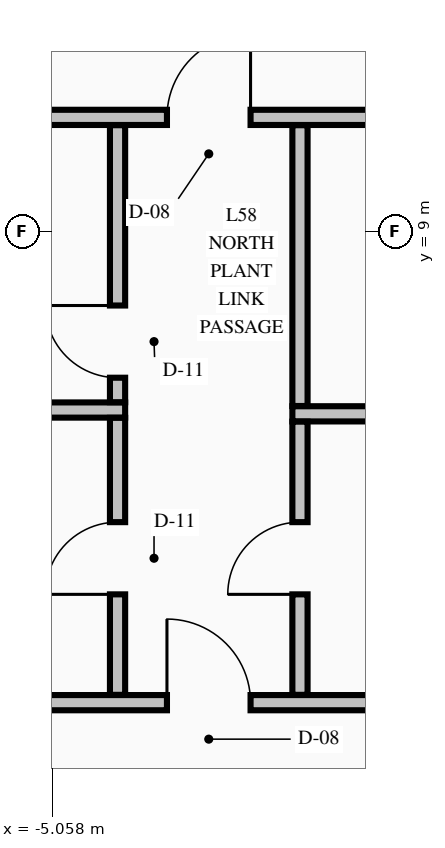
"""IFC4 building model, lengths in metres.
Left out: names, types, materials, properties, quantities, classifications, styles, units other than length and angle.
Written with IfcOpenShell. Run it as: python <this file> out.ifc"""

import sys

from ifc_helpers import new_model, si_unit, direction, frame, frame_2d, origin, place, context, subcontext, project, spatial, rectangle, extrude, element, fill, save


model = new_model("IFC4")
c1 = context("Model", 3, precision=1e-05, world=origin(), true_north=direction((0.0, 1.0)))
c2 = subcontext(c1, "Body", "Model", "MODEL_VIEW")
j1 = project(units=[si_unit("LENGTHUNIT", "METRE"), si_unit("PLANEANGLEUNIT", "RADIAN")], contexts=[c1])
p1 = place(None, origin())
s1 = spatial("IfcSite", under=j1, at=p1, CompositionType="ELEMENT")
p2 = place(p1, origin())
s2 = spatial("IfcBuilding", under=s1, at=p2, CompositionType="ELEMENT")
p3 = place(p2, frame((0.0, 0.0, 222.06)))
s3 = spatial("IfcBuildingStorey", under=s2, at=p3, CompositionType="ELEMENT", Elevation=222.06)
p4 = place(p3, frame((-10.847, 2.8, 0.0), z_axis=(0.0, 0.0, 1.0), x_axis=(1.0, 0.0, 0.0)))
e1 = element("IfcWall", 1, at=p4, inside=s3, PredefinedType="PARTITIONING", context=c2, shape_type="SweptSolid", body=[
    extrude(rectangle(XDim=21.694, YDim=0.2, at=frame_2d((10.847, 0.0))), origin(), (0.0, 0.0, 1.0), 4.335),
])
p5 = place(p4, frame((7.297, 0.0, 0.0)))
e2 = element("IfcOpeningElement", 2, at=p5, cuts=e1, PredefinedType="OPENING", context=c2, shape_type="SweptSolid", body=[
    extrude(rectangle(XDim=1.1, YDim=2.15, at=frame_2d((0.55, 1.075))), frame((0.0, 0.11, 0.0), z_axis=(0.0, -1.0, 0.0), x_axis=(1.0, 0.0, 0.0)), (0.0, 0.0, 1.0), 0.22),
])
p6 = place(p4, frame((17.497, 0.0, 0.0)))
e3 = element("IfcOpeningElement", 3, at=p6, cuts=e1, PredefinedType="OPENING", context=c2, shape_type="SweptSolid", body=[
    extrude(rectangle(XDim=1.1, YDim=2.15, at=frame_2d((0.55, 1.075))), frame((0.0, 0.11, 0.0), z_axis=(0.0, -1.0, 0.0), x_axis=(1.0, 0.0, 0.0)), (0.0, 0.0, 1.0), 0.22),
])
p7 = place(p3, frame((-1.9, 6.6, 0.0), z_axis=(0.0, 0.0, 1.0), x_axis=(1.0, 0.0, 0.0)))
e4 = element("IfcWall", 4, at=p7, inside=s3, PredefinedType="PARTITIONING", context=c2, shape_type="SweptSolid", body=[
    extrude(rectangle(XDim=12.747, YDim=0.2, at=frame_2d((6.374, 0.0))), origin(), (0.0, 0.0, 1.0), 4.335),
])
p8 = place(p3, frame((-10.847, 6.65, 0.0), z_axis=(0.0, 0.0, 1.0), x_axis=(1.0, 0.0, 0.0)))
e5 = element("IfcWall", 5, at=p8, inside=s3, PredefinedType="PARTITIONING", context=c2, shape_type="SweptSolid", body=[
    extrude(rectangle(XDim=6.747, YDim=0.2, at=frame_2d((3.374, 0.0))), origin(), (0.0, 0.0, 1.0), 4.335),
])
p9 = place(p3, frame((-10.788, 10.5, 0.0), z_axis=(0.0, 0.0, 1.0), x_axis=(1.0, 0.0, 0.0)))
e6 = element("IfcWall", 6, at=p9, inside=s3, PredefinedType="PARTITIONING", context=c2, shape_type="SweptSolid", body=[
    extrude(rectangle(XDim=21.576, YDim=0.2, at=frame_2d((10.788, 0.0))), origin(), (0.0, 0.0, 1.0), 4.335),
])
p10 = place(p9, frame((7.238, 0.0, 0.0)))
e7 = element("IfcOpeningElement", 7, at=p10, cuts=e6, PredefinedType="OPENING", context=c2, shape_type="SweptSolid", body=[
    extrude(rectangle(XDim=1.1, YDim=2.15, at=frame_2d((0.55, 1.075))), frame((0.0, 0.11, 0.0), z_axis=(0.0, -1.0, 0.0), x_axis=(1.0, 0.0, 0.0)), (0.0, 0.0, 1.0), 0.22),
])
p11 = place(p3, frame((-4.2, 2.903, 0.0), z_axis=(0.0, 0.0, 1.0), x_axis=(0.0, 1.0, 0.0)))
e8 = element("IfcWall", 8, at=p11, inside=s3, PredefinedType="PARTITIONING", context=c2, shape_type="SweptSolid", body=[
    extrude(rectangle(XDim=3.644, YDim=0.2, at=frame_2d((1.822, 0.0))), origin(), (0.0, 0.0, 1.0), 4.335),
])
p12 = place(p11, frame((1.322, 0.0, 0.0)))
e9 = element("IfcOpeningElement", 9, at=p12, cuts=e8, PredefinedType="OPENING", context=c2, shape_type="SweptSolid", body=[
    extrude(rectangle(XDim=0.95, YDim=2.15, at=frame_2d((0.475, 1.075))), frame((0.0, 0.11, 0.0), z_axis=(0.0, -1.0, 0.0), x_axis=(1.0, 0.0, 0.0)), (0.0, 0.0, 1.0), 0.22),
])
p13 = place(p3, frame((-4.2, 6.753, 0.0), z_axis=(0.0, 0.0, 1.0), x_axis=(0.0, 1.0, 0.0)))
e10 = element("IfcWall", 10, at=p13, inside=s3, PredefinedType="PARTITIONING", context=c2, shape_type="SweptSolid", body=[
    extrude(rectangle(XDim=3.644, YDim=0.2, at=frame_2d((1.822, 0.0))), origin(), (0.0, 0.0, 1.0), 4.335),
])
p14 = place(p13, frame((0.322, 0.0, 0.0)))
e11 = element("IfcOpeningElement", 11, at=p14, cuts=e10, PredefinedType="OPENING", context=c2, shape_type="SweptSolid", body=[
    extrude(rectangle(XDim=0.95, YDim=2.15, at=frame_2d((0.475, 1.075))), frame((0.0, 0.11, 0.0), z_axis=(0.0, -1.0, 0.0), x_axis=(1.0, 0.0, 0.0)), (0.0, 0.0, 1.0), 0.22),
])
p15 = place(p3, frame((-1.8, 2.903, 0.0), z_axis=(0.0, 0.0, 1.0), x_axis=(0.0, 1.0, 0.0)))
e12 = element("IfcWall", 12, at=p15, inside=s3, PredefinedType="PARTITIONING", context=c2, shape_type="SweptSolid", body=[
    extrude(rectangle(XDim=3.594, YDim=0.2, at=frame_2d((1.797, 0.0))), origin(), (0.0, 0.0, 1.0), 4.335),
])
p16 = place(p15, frame((1.322, 0.0, 0.0)))
e13 = element("IfcOpeningElement", 13, at=p16, cuts=e12, PredefinedType="OPENING", context=c2, shape_type="SweptSolid", body=[
    extrude(rectangle(XDim=0.95, YDim=2.15, at=frame_2d((0.475, 1.075))), frame((0.0, 0.11, 0.0), z_axis=(0.0, -1.0, 0.0), x_axis=(1.0, 0.0, 0.0)), (0.0, 0.0, 1.0), 0.22),
])
p17 = place(p3, frame((-1.8, 6.703, 0.0), z_axis=(0.0, 0.0, 1.0), x_axis=(0.0, 1.0, 0.0)))
e14 = element("IfcWall", 14, at=p17, inside=s3, PredefinedType="PARTITIONING", context=c2, shape_type="SweptSolid", body=[
    extrude(rectangle(XDim=3.694, YDim=0.2, at=frame_2d((1.847, 0.0))), origin(), (0.0, 0.0, 1.0), 4.335),
])
p18 = place(p5, origin())
e15 = element("IfcDoor", 15, at=p18, inside=s3, OperationType="SINGLE_SWING_LEFT", PredefinedType="DOOR", context=c2, shape_type="SweptSolid", body=[
    extrude(rectangle(XDim=1.1, YDim=2.15, at=frame_2d((0.55, 1.075))), frame((0.0, 0.025, 0.0), z_axis=(0.0, -1.0, 0.0), x_axis=(1.0, 0.0, 0.0)), (0.0, 0.0, 1.0), 0.05),
])
fill(e2, e15)
p19 = place(p10, origin())
e16 = element("IfcDoor", 16, at=p19, inside=s3, OperationType="SINGLE_SWING_RIGHT", PredefinedType="DOOR", context=c2, shape_type="SweptSolid", body=[
    extrude(rectangle(XDim=1.1, YDim=2.15, at=frame_2d((0.55, 1.075))), frame((0.0, 0.025, 0.0), z_axis=(0.0, -1.0, 0.0), x_axis=(1.0, 0.0, 0.0)), (0.0, 0.0, 1.0), 0.05),
])
fill(e7, e16)
p20 = place(p12, origin())
e17 = element("IfcDoor", 17, at=p20, inside=s3, OperationType="SINGLE_SWING_LEFT", PredefinedType="DOOR", context=c2, shape_type="SweptSolid", body=[
    extrude(rectangle(XDim=0.95, YDim=2.15, at=frame_2d((0.475, 1.075))), frame((0.0, 0.025, 0.0), z_axis=(0.0, -1.0, 0.0), x_axis=(1.0, 0.0, 0.0)), (0.0, 0.0, 1.0), 0.05),
])
fill(e9, e17)
p21 = place(p14, origin())
e18 = element("IfcDoor", 18, at=p21, inside=s3, OperationType="SINGLE_SWING_RIGHT", PredefinedType="DOOR", context=c2, shape_type="SweptSolid", body=[
    extrude(rectangle(XDim=0.95, YDim=2.15, at=frame_2d((0.475, 1.075))), frame((0.0, 0.025, 0.0), z_axis=(0.0, -1.0, 0.0), x_axis=(1.0, 0.0, 0.0)), (0.0, 0.0, 1.0), 0.05),
])
fill(e11, e18)
p22 = place(p16, origin())
e19 = element("IfcDoor", 19, at=p22, inside=s3, OperationType="SINGLE_SWING_LEFT", PredefinedType="DOOR", context=c2, shape_type="SweptSolid", body=[
    extrude(rectangle(XDim=0.95, YDim=2.15, at=frame_2d((0.475, 1.075))), frame((0.0, 0.025, 0.0), z_axis=(0.0, -1.0, 0.0), x_axis=(1.0, 0.0, 0.0)), (0.0, 0.0, 1.0), 0.05),
])
fill(e13, e19)
save(model, sys.argv[1])
